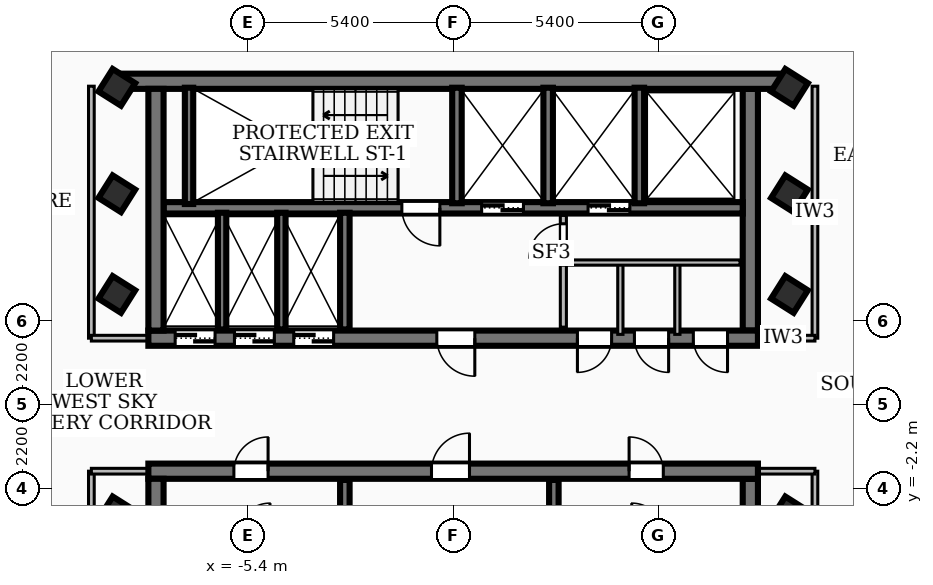
"""IFC4 building model, lengths in metres.
Left out: names, types, materials, properties, quantities, classifications, styles, units other than length and angle.
Written with IfcOpenShell. Run it as: python <this file> out.ifc"""

import sys

from ifc_helpers import new_model, si_unit, direction, frame, frame_2d, origin, origin_2d, place, context, subcontext, project, spatial, rectangle, extrude, element, fill, save


model = new_model("IFC4")
c1 = context("Model", 3, precision=1e-05, world=origin(), true_north=direction((0.0, 1.0)))
c2 = subcontext(c1, "Body", "Model", "MODEL_VIEW")
j1 = project(units=[si_unit("LENGTHUNIT", "METRE"), si_unit("PLANEANGLEUNIT", "RADIAN")], contexts=[c1])
p1 = place(None, origin())
s1 = spatial("IfcSite", under=j1, at=p1, CompositionType="ELEMENT")
p2 = place(p1, origin())
s2 = spatial("IfcBuilding", under=s1, at=p2, CompositionType="ELEMENT")
p3 = place(p2, frame((0.0, 0.0, 274.86)))
s3 = spatial("IfcBuildingStorey", under=s2, at=p3, CompositionType="ELEMENT", Elevation=274.86)
p4 = place(p3, frame((-8.78, 8.51, 0.0), z_axis=(0.0, 0.0, 1.0), x_axis=(1.0, 0.0, 0.0)))
e1 = element("IfcWall", 1, at=p4, inside=s3, PredefinedType="SHEAR", context=c2, shape_type="SweptSolid", body=[
    extrude(rectangle(XDim=17.56, YDim=0.4, at=frame_2d((8.78, 0.0))), origin(), (0.0, 0.0, 1.0), 3.16),
])
p5 = place(p3, frame((8.02, 1.75, 0.0), z_axis=(0.0, 0.0, 1.0), x_axis=(-1.0, 0.0, 0.0)))
e2 = element("IfcWall", 2, at=p5, inside=s3, PredefinedType="SHEAR", context=c2, shape_type="SweptSolid", body=[
    extrude(rectangle(XDim=16.04, YDim=0.4, at=frame_2d((8.02, 0.0))), origin(), (0.0, 0.0, 1.0), 3.16),
])
p6 = place(p5, frame((7.45, 0.0, 0.0)))
e3 = element("IfcOpeningElement", 3, at=p6, cuts=e2, PredefinedType="OPENING", context=c2, shape_type="SweptSolid", body=[
    extrude(rectangle(XDim=1.0, YDim=2.1, at=frame_2d((0.5, 1.05))), frame((0.0, 0.21, 0.0), z_axis=(0.0, -1.0, 0.0), x_axis=(1.0, 0.0, 0.0)), (0.0, 0.0, 1.0), 0.42),
])
p7 = place(p5, frame((14.285, 0.0, 0.0)))
e4 = element("IfcOpeningElement", 4, at=p7, cuts=e2, PredefinedType="OPENING", context=c2, shape_type="SweptSolid", body=[
    extrude(rectangle(XDim=1.05, YDim=2.15, at=frame_2d((0.525, 1.075))), frame((0.0, 0.21, 0.0), z_axis=(0.0, -1.0, 0.0), x_axis=(1.0, 0.0, 0.0)), (0.0, 0.0, 1.0), 0.42),
])
p8 = place(p5, frame((12.725, 0.0, 0.0)))
e5 = element("IfcOpeningElement", 5, at=p8, cuts=e2, PredefinedType="OPENING", context=c2, shape_type="SweptSolid", body=[
    extrude(rectangle(XDim=1.05, YDim=2.15, at=frame_2d((0.525, 1.075))), frame((0.0, 0.21, 0.0), z_axis=(0.0, -1.0, 0.0), x_axis=(1.0, 0.0, 0.0)), (0.0, 0.0, 1.0), 0.42),
])
p9 = place(p5, frame((11.165, 0.0, 0.0)))
e6 = element("IfcOpeningElement", 6, at=p9, cuts=e2, PredefinedType="OPENING", context=c2, shape_type="SweptSolid", body=[
    extrude(rectangle(XDim=1.05, YDim=2.15, at=frame_2d((0.525, 1.075))), frame((0.0, 0.21, 0.0), z_axis=(0.0, -1.0, 0.0), x_axis=(1.0, 0.0, 0.0)), (0.0, 0.0, 1.0), 0.42),
])
p10 = place(p5, frame((3.85, 0.0, 0.0)))
e7 = element("IfcOpeningElement", 7, at=p10, cuts=e2, PredefinedType="OPENING", context=c2, shape_type="SweptSolid", body=[
    extrude(rectangle(XDim=0.9, YDim=2.06, at=frame_2d((0.45, 1.03))), frame((0.0, 0.21, 0.0), z_axis=(0.0, -1.0, 0.0), x_axis=(1.0, 0.0, 0.0)), (0.0, 0.0, 1.0), 0.42),
])
p11 = place(p5, frame((2.35, 0.0, 0.0)))
e8 = element("IfcOpeningElement", 8, at=p11, cuts=e2, PredefinedType="OPENING", context=c2, shape_type="SweptSolid", body=[
    extrude(rectangle(XDim=0.9, YDim=2.06, at=frame_2d((0.45, 1.03))), frame((0.0, 0.21, 0.0), z_axis=(0.0, -1.0, 0.0), x_axis=(1.0, 0.0, 0.0)), (0.0, 0.0, 1.0), 0.42),
])
p12 = place(p5, frame((0.8, 0.0, 0.0)))
e9 = element("IfcOpeningElement", 9, at=p12, cuts=e2, PredefinedType="OPENING", context=c2, shape_type="SweptSolid", body=[
    extrude(rectangle(XDim=0.9, YDim=2.06, at=frame_2d((0.45, 1.03))), frame((0.0, 0.21, 0.0), z_axis=(0.0, -1.0, 0.0), x_axis=(1.0, 0.0, 0.0)), (0.0, 0.0, 1.0), 0.42),
])
for number, where, z_axis, x_axis in (
    (10, (-7.82, 1.95, 0.0), (0.0, 0.0, 1.0), (0.0, 1.0, 0.0)),
    (11, (7.82, 8.31, 0.0), (0.0, 0.0, 1.0), (0.0, -1.0, 0.0)),
):
    element("IfcWall", number, at=place(p3, frame(where, z_axis=z_axis, x_axis=x_axis)), inside=s3, PredefinedType="SHEAR", context=c2, shape_type="SweptSolid", body=[
        extrude(rectangle(XDim=6.36, YDim=0.4, at=frame_2d((3.18, 0.0))), origin(), (0.0, 0.0, 1.0), 3.16),
    ])
p13 = place(p3, frame((7.62, 5.18, 0.0), z_axis=(0.0, 0.0, 1.0), x_axis=(-1.0, 0.0, 0.0)))
e12 = element("IfcWall", 12, at=p13, inside=s3, PredefinedType="SOLIDWALL", context=c2, shape_type="SweptSolid", body=[
    extrude(rectangle(XDim=15.24, YDim=0.3, at=frame_2d((7.62, 0.0))), origin(), (0.0, 0.0, 1.0), 3.16),
])
p14 = place(p13, frame((5.77, 0.0, 0.0)))
e13 = element("IfcOpeningElement", 13, at=p14, cuts=e12, PredefinedType="OPENING", context=c2, shape_type="SweptSolid", body=[
    extrude(rectangle(XDim=1.1, YDim=2.15, at=frame_2d((0.55, 1.075))), frame((0.0, 0.16, 0.0), z_axis=(0.0, -1.0, 0.0), x_axis=(1.0, 0.0, 0.0)), (0.0, 0.0, 1.0), 0.32),
])
p15 = place(p13, frame((2.97, 0.0, 0.0)))
e14 = element("IfcOpeningElement", 14, at=p15, cuts=e12, PredefinedType="OPENING", context=c2, shape_type="SweptSolid", body=[
    extrude(rectangle(XDim=1.1, YDim=2.15, at=frame_2d((0.55, 1.075))), frame((0.0, 0.16, 0.0), z_axis=(0.0, -1.0, 0.0), x_axis=(1.0, 0.0, 0.0)), (0.0, 0.0, 1.0), 0.32),
])
p16 = place(p13, frame((7.97, 0.0, 0.0)))
e15 = element("IfcOpeningElement", 15, at=p16, cuts=e12, PredefinedType="OPENING", context=c2, shape_type="SweptSolid", body=[
    extrude(rectangle(XDim=1.0, YDim=2.1, at=frame_2d((0.5, 1.05))), frame((0.0, 0.16, 0.0), z_axis=(0.0, -1.0, 0.0), x_axis=(1.0, 0.0, 0.0)), (0.0, 0.0, 1.0), 0.32),
])
p17 = place(p3, frame((-8.02, -1.75, 0.0), z_axis=(0.0, 0.0, 1.0), x_axis=(1.0, 0.0, 0.0)))
e16 = element("IfcWall", 16, at=p17, inside=s3, PredefinedType="SHEAR", context=c2, shape_type="SweptSolid", body=[
    extrude(rectangle(XDim=16.04, YDim=0.4, at=frame_2d((8.02, 0.0))), origin(), (0.0, 0.0, 1.0), 3.16),
])
p18 = place(p17, frame((7.45, 0.0, 0.0)))
e17 = element("IfcOpeningElement", 17, at=p18, cuts=e16, PredefinedType="OPENING", context=c2, shape_type="SweptSolid", body=[
    extrude(rectangle(XDim=1.0, YDim=2.1, at=frame_2d((0.5, 1.05))), frame((0.0, 0.21, 0.0), z_axis=(0.0, -1.0, 0.0), x_axis=(1.0, 0.0, 0.0)), (0.0, 0.0, 1.0), 0.42),
])
p19 = place(p17, frame((12.65, 0.0, 0.0)))
e18 = element("IfcOpeningElement", 18, at=p19, cuts=e16, PredefinedType="OPENING", context=c2, shape_type="SweptSolid", body=[
    extrude(rectangle(XDim=0.9, YDim=2.06, at=frame_2d((0.45, 1.03))), frame((0.0, 0.21, 0.0), z_axis=(0.0, -1.0, 0.0), x_axis=(1.0, 0.0, 0.0)), (0.0, 0.0, 1.0), 0.42),
])
p20 = place(p17, frame((2.25, 0.0, 0.0)))
e19 = element("IfcOpeningElement", 19, at=p20, cuts=e16, PredefinedType="OPENING", context=c2, shape_type="SweptSolid", body=[
    extrude(rectangle(XDim=0.9, YDim=2.06, at=frame_2d((0.45, 1.03))), frame((0.0, 0.21, 0.0), z_axis=(0.0, -1.0, 0.0), x_axis=(1.0, 0.0, 0.0)), (0.0, 0.0, 1.0), 0.42),
])
for number, where, z_axis, x_axis in (
    (20, (-7.82, -8.31, 0.0), (0.0, 0.0, 1.0), (0.0, 1.0, 0.0)),
    (21, (7.82, -1.95, 0.0), (0.0, 0.0, 1.0), (0.0, -1.0, 0.0)),
):
    element("IfcWall", number, at=place(p3, frame(where, z_axis=z_axis, x_axis=x_axis)), inside=s3, PredefinedType="SHEAR", context=c2, shape_type="SweptSolid", body=[
        extrude(rectangle(XDim=6.36, YDim=0.4, at=frame_2d((3.18, 0.0))), origin(), (0.0, 0.0, 1.0), 3.16),
    ])
p21 = place(p3, frame((-6.95, 5.28, 0.0), z_axis=(0.0, 0.0, 1.0), x_axis=(0.0, 1.0, 0.0)))
e22 = element("IfcWall", 22, at=p21, inside=s3, PredefinedType="SOLIDWALL", context=c2, shape_type="SweptSolid", body=[
    extrude(rectangle(XDim=3.06, YDim=0.22, at=frame_2d((1.53, 0.0))), origin(), (0.0, 0.0, 1.0), 3.16),
])
for number, where, z_axis, x_axis in (
    (23, (0.1, 5.3, 0.0), (0.0, 0.0, 1.0), (0.0, 1.0, 0.0)),
    (24, (2.5, 5.3, 0.0), (0.0, 0.0, 1.0), (0.0, 1.0, 0.0)),
    (25, (4.9, 5.3, 0.0), (0.0, 0.0, 1.0), (0.0, 1.0, 0.0)),
):
    element("IfcWall", number, at=place(p3, frame(where, z_axis=z_axis, x_axis=x_axis)), inside=s3, PredefinedType="SOLIDWALL", context=c2, shape_type="SweptSolid", body=[
        extrude(rectangle(XDim=3.04, YDim=0.25, at=frame_2d((1.52, 0.0))), origin(), (0.0, 0.0, 1.0), 3.16),
    ])
for number, where, z_axis, x_axis in (
    (26, (-2.85, 1.98, 0.0), (0.0, 0.0, 1.0), (0.0, 1.0, 0.0)),
    (27, (-2.85, -5.05, 0.0), (0.0, 0.0, 1.0), (0.0, 1.0, 0.0)),
    (28, (2.65, -5.05, 0.0), (0.0, 0.0, 1.0), (0.0, 1.0, 0.0)),
):
    element("IfcWall", number, at=place(p3, frame(where, z_axis=z_axis, x_axis=x_axis)), inside=s3, PredefinedType="SOLIDWALL", context=c2, shape_type="SweptSolid", body=[
        extrude(rectangle(XDim=3.07, YDim=0.25, at=frame_2d((1.535, 0.0))), origin(), (0.0, 0.0, 1.0), 3.16),
    ])
for number, where, z_axis, x_axis in (
    (29, (-6.08, 1.98, 0.0), (0.0, 0.0, 1.0), (0.0, 1.0, 0.0)),
    (30, (-4.52, 1.98, 0.0), (0.0, 0.0, 1.0), (0.0, 1.0, 0.0)),
):
    element("IfcWall", number, at=place(p3, frame(where, z_axis=z_axis, x_axis=x_axis)), inside=s3, PredefinedType="SOLIDWALL", context=c2, shape_type="SweptSolid", body=[
        extrude(rectangle(XDim=3.07, YDim=0.22, at=frame_2d((1.535, 0.0))), origin(), (0.0, 0.0, 1.0), 3.16),
    ])
for number, where, z_axis, x_axis in (
    (31, (-8.85, -2.9, 0.0), (0.0, 0.0, 1.0), (0.534, 0.845, 0.0)),
    (32, (-8.85, 2.9, 0.0), (0.0, 0.0, 1.0), (0.534, 0.845, 0.0)),
    (33, (-8.85, 5.55, 0.0), (0.0, 0.0, 1.0), (0.534, 0.845, 0.0)),
    (34, (8.85, -2.9, 0.0), (0.0, 0.0, 1.0), (0.534, 0.845, 0.0)),
    (35, (8.85, 2.9, 0.0), (0.0, 0.0, 1.0), (0.534, 0.845, 0.0)),
    (36, (8.85, 5.55, 0.0), (0.0, 0.0, 1.0), (0.534, 0.845, 0.0)),
    (37, (-8.85, 8.35, 0.0), (0.0, 0.0, 1.0), (0.534, 0.845, 0.0)),
    (38, (8.85, 8.35, 0.0), (0.0, 0.0, 1.0), (0.534, 0.845, 0.0)),
):
    element("IfcColumn", number, at=place(p3, frame(where, z_axis=z_axis, x_axis=x_axis)), inside=s3, PredefinedType="COLUMN", context=c2, shape_type="SweptSolid", body=[
        extrude(rectangle(XDim=0.7, YDim=0.7, at=origin_2d()), origin(), (0.0, 0.0, 1.0), 3.42),
    ])
p22 = place(p3, frame((2.9, 2.04, 0.0), z_axis=(0.0, 0.0, 1.0), x_axis=(0.0, 1.0, 0.0)))
e39 = element("IfcWall", 39, at=p22, inside=s3, PredefinedType="PARTITIONING", context=c2, shape_type="SweptSolid", body=[
    extrude(rectangle(XDim=2.94, YDim=0.16, at=frame_2d((1.47, 0.0))), origin(), (0.0, 0.0, 1.0), 2.39),
])
p23 = place(p22, frame((1.82, 0.0, 0.0)))
e40 = element("IfcOpeningElement", 40, at=p23, cuts=e39, PredefinedType="OPENING", context=c2, shape_type="SweptSolid", body=[
    extrude(rectangle(XDim=0.9, YDim=2.06, at=frame_2d((0.45, 1.03))), frame((0.0, 0.09, 0.0), z_axis=(0.0, -1.0, 0.0), x_axis=(1.0, 0.0, 0.0)), (0.0, 0.0, 1.0), 0.18),
])
p24 = place(p3, frame((2.9, 3.74, 0.0), z_axis=(0.0, 0.0, 1.0), x_axis=(1.0, 0.0, 0.0)))
e41 = element("IfcWall", 41, at=p24, inside=s3, PredefinedType="PARTITIONING", context=c2, shape_type="SweptSolid", body=[
    extrude(rectangle(XDim=4.65, YDim=0.138, at=frame_2d((2.325, 0.0))), origin(), (0.0, 0.0, 1.0), 3.16),
])
for number, where, z_axis, x_axis in (
    (42, (4.4, 1.85, 0.0), (0.0, 0.0, 1.0), (0.0, 1.0, 0.0)),
    (43, (5.9, 1.85, 0.0), (0.0, 0.0, 1.0), (0.0, 1.0, 0.0)),
):
    element("IfcWall", number, at=place(p3, frame(where, z_axis=z_axis, x_axis=x_axis)), inside=s3, PredefinedType="PARTITIONING", context=c2, shape_type="SweptSolid", body=[
        extrude(rectangle(XDim=1.89, YDim=0.138, at=frame_2d((0.945, 0.0))), origin(), (0.0, 0.0, 1.0), 2.39),
    ])
p25 = place(p3, frame((-9.52, 1.75, 0.0), z_axis=(0.0, 0.0, 1.0), x_axis=(0.0, 1.0, 0.0)))
e44 = element("IfcWall", 44, at=p25, inside=s3, PredefinedType="PARTITIONING", context=c2, shape_type="SweptSolid", body=[
    extrude(rectangle(XDim=6.63, YDim=0.15, at=frame_2d((3.315, 0.0))), origin(), (0.0, 0.0, 1.0), 2.53),
])
p26 = place(p3, frame((-7.85, 1.75, 0.0), z_axis=(0.0, 0.0, 1.0), x_axis=(-1.0, 0.0, 0.0)))
e45 = element("IfcWall", 45, at=p26, inside=s3, PredefinedType="PARTITIONING", context=c2, shape_type="SweptSolid", body=[
    extrude(rectangle(XDim=1.67, YDim=0.15, at=frame_2d((0.835, 0.0))), origin(), (0.0, 0.0, 1.0), 2.39),
])
p27 = place(p3, frame((-9.52, -8.38, 0.0), z_axis=(0.0, 0.0, 1.0), x_axis=(0.0, 1.0, 0.0)))
e46 = element("IfcWall", 46, at=p27, inside=s3, PredefinedType="PARTITIONING", context=c2, shape_type="SweptSolid", body=[
    extrude(rectangle(XDim=6.63, YDim=0.15, at=frame_2d((3.315, 0.0))), origin(), (0.0, 0.0, 1.0), 3.16),
])
p28 = place(p3, frame((-7.85, -1.75, 0.0), z_axis=(0.0, 0.0, 1.0), x_axis=(-1.0, 0.0, 0.0)))
e47 = element("IfcWall", 47, at=p28, inside=s3, PredefinedType="PARTITIONING", context=c2, shape_type="SweptSolid", body=[
    extrude(rectangle(XDim=1.67, YDim=0.15, at=frame_2d((0.835, 0.0))), origin(), (0.0, 0.0, 1.0), 2.39),
])
p29 = place(p3, frame((9.52, 1.75, 0.0), z_axis=(0.0, 0.0, 1.0), x_axis=(0.0, 1.0, 0.0)))
e48 = element("IfcWall", 48, at=p29, inside=s3, PredefinedType="PARTITIONING", context=c2, shape_type="SweptSolid", body=[
    extrude(rectangle(XDim=6.63, YDim=0.15, at=frame_2d((3.315, 0.0))), origin(), (0.0, 0.0, 1.0), 3.16),
])
p30 = place(p3, frame((7.85, 1.75, 0.0), z_axis=(0.0, 0.0, 1.0), x_axis=(1.0, 0.0, 0.0)))
e49 = element("IfcWall", 49, at=p30, inside=s3, PredefinedType="PARTITIONING", context=c2, shape_type="SweptSolid", body=[
    extrude(rectangle(XDim=1.67, YDim=0.15, at=frame_2d((0.835, 0.0))), origin(), (0.0, 0.0, 1.0), 2.39),
])
p31 = place(p3, frame((9.52, -8.38, 0.0), z_axis=(0.0, 0.0, 1.0), x_axis=(0.0, 1.0, 0.0)))
e50 = element("IfcWall", 50, at=p31, inside=s3, PredefinedType="PARTITIONING", context=c2, shape_type="SweptSolid", body=[
    extrude(rectangle(XDim=6.63, YDim=0.15, at=frame_2d((3.315, 0.0))), origin(), (0.0, 0.0, 1.0), 2.53),
])
p32 = place(p3, frame((7.85, -1.75, 0.0), z_axis=(0.0, 0.0, 1.0), x_axis=(1.0, 0.0, 0.0)))
e51 = element("IfcWall", 51, at=p32, inside=s3, PredefinedType="PARTITIONING", context=c2, shape_type="SweptSolid", body=[
    extrude(rectangle(XDim=1.67, YDim=0.15, at=frame_2d((0.835, 0.0))), origin(), (0.0, 0.0, 1.0), 2.39),
])
p33 = place(p3, frame((15.512, 7.104, 0.0), z_axis=(0.0, 0.0, 1.0), x_axis=(-0.845450958208, 0.534053065963, 0.0)))
e52 = element("IfcWall", 52, at=p33, inside=s3, PredefinedType="PARTITIONING", context=c2, shape_type="SweptSolid", body=[
    extrude(rectangle(XDim=7.951, YDim=0.1, at=frame_2d((3.975, 0.0))), origin(), (0.0, 0.0, 1.0), 2.53),
])
p34 = place(p3, frame((-17.646, -1.178, 0.0), z_axis=(0.0, 0.0, 1.0), x_axis=(0.534052309352, 0.845451436143, 0.0)))
e53 = element("IfcWall", 53, at=p34, inside=s3, PredefinedType="PARTITIONING", context=c2, shape_type="SweptSolid", body=[
    extrude(rectangle(XDim=20.44, YDim=0.1, at=frame_2d((10.22, 0.0))), origin(), (0.0, 0.0, 1.0), 2.53),
])
p35 = place(p34, frame((11.259, 0.0, 0.0)))
e54 = element("IfcOpeningElement", 54, at=p35, cuts=e53, PredefinedType="OPENING", context=c2, shape_type="SweptSolid", body=[
    extrude(rectangle(XDim=0.86, YDim=2.04, at=frame_2d((0.43, 1.02))), frame((0.0, 0.06, 0.0), z_axis=(0.0, -1.0, 0.0), x_axis=(1.0, 0.0, 0.0)), (0.0, 0.0, 1.0), 0.12),
])
p36 = place(p34, frame((9.819, 0.0, 0.0)))
e55 = element("IfcOpeningElement", 55, at=p36, cuts=e53, PredefinedType="OPENING", context=c2, shape_type="SweptSolid", body=[
    extrude(rectangle(XDim=0.86, YDim=2.04, at=frame_2d((0.43, 1.02))), frame((0.0, 0.06, 0.0), z_axis=(0.0, -1.0, 0.0), x_axis=(1.0, 0.0, 0.0)), (0.0, 0.0, 1.0), 0.12),
])
p37 = place(p3, frame((17.646, 1.178, 0.0), z_axis=(0.0, 0.0, 1.0), x_axis=(-0.534052309352, -0.845451436143, 0.0)))
e56 = element("IfcWall", 56, at=p37, inside=s3, PredefinedType="PARTITIONING", context=c2, shape_type="SweptSolid", body=[
    extrude(rectangle(XDim=20.44, YDim=0.1, at=frame_2d((10.22, 0.0))), origin(), (0.0, 0.0, 1.0), 2.53),
])
p38 = place(p37, frame((10.159, 0.0, 0.0)))
e57 = element("IfcOpeningElement", 57, at=p38, cuts=e56, PredefinedType="OPENING", context=c2, shape_type="SweptSolid", body=[
    extrude(rectangle(XDim=0.86, YDim=2.04, at=frame_2d((0.43, 1.02))), frame((0.0, 0.06, 0.0), z_axis=(0.0, -1.0, 0.0), x_axis=(1.0, 0.0, 0.0)), (0.0, 0.0, 1.0), 0.12),
])
p39 = place(p37, frame((8.719, 0.0, 0.0)))
e58 = element("IfcOpeningElement", 58, at=p39, cuts=e56, PredefinedType="OPENING", context=c2, shape_type="SweptSolid", body=[
    extrude(rectangle(XDim=0.86, YDim=2.04, at=frame_2d((0.43, 1.02))), frame((0.0, 0.06, 0.0), z_axis=(0.0, -1.0, 0.0), x_axis=(1.0, 0.0, 0.0)), (0.0, 0.0, 1.0), 0.12),
])
p40 = place(p6, origin())
e59 = element("IfcDoor", 59, at=p40, inside=s3, OperationType="SINGLE_SWING_LEFT", PredefinedType="DOOR", context=c2, shape_type="SweptSolid", body=[
    extrude(rectangle(XDim=1.0, YDim=2.1, at=frame_2d((0.5, 1.05))), frame((0.0, 0.025, 0.0), z_axis=(0.0, -1.0, 0.0), x_axis=(1.0, 0.0, 0.0)), (0.0, 0.0, 1.0), 0.05),
])
fill(e3, e59)
p41 = place(p18, origin())
e60 = element("IfcDoor", 60, at=p41, inside=s3, OperationType="SINGLE_SWING_RIGHT", PredefinedType="DOOR", context=c2, shape_type="SweptSolid", body=[
    extrude(rectangle(XDim=1.0, YDim=2.1, at=frame_2d((0.5, 1.05))), frame((0.0, 0.025, 0.0), z_axis=(0.0, -1.0, 0.0), x_axis=(1.0, 0.0, 0.0)), (0.0, 0.0, 1.0), 0.05),
])
fill(e17, e60)
p42 = place(p14, origin())
e61 = element("IfcDoor", 61, at=p42, inside=s3, OperationType="DOUBLE_DOOR_SLIDING", PredefinedType="DOOR", context=c2, shape_type="SweptSolid", body=[
    extrude(rectangle(XDim=1.1, YDim=2.15, at=frame_2d((0.55, 1.075))), frame((0.0, 0.025, 0.0), z_axis=(0.0, -1.0, 0.0), x_axis=(1.0, 0.0, 0.0)), (0.0, 0.0, 1.0), 0.05),
])
fill(e13, e61)
p43 = place(p15, origin())
e62 = element("IfcDoor", 62, at=p43, inside=s3, OperationType="DOUBLE_DOOR_SLIDING", PredefinedType="DOOR", context=c2, shape_type="SweptSolid", body=[
    extrude(rectangle(XDim=1.1, YDim=2.15, at=frame_2d((0.55, 1.075))), frame((0.0, 0.025, 0.0), z_axis=(0.0, -1.0, 0.0), x_axis=(1.0, 0.0, 0.0)), (0.0, 0.0, 1.0), 0.05),
])
fill(e14, e62)
p44 = place(p16, origin())
e63 = element("IfcDoor", 63, at=p44, inside=s3, OperationType="SINGLE_SWING_LEFT", PredefinedType="DOOR", context=c2, shape_type="SweptSolid", body=[
    extrude(rectangle(XDim=1.0, YDim=2.1, at=frame_2d((0.5, 1.05))), frame((0.0, 0.025, 0.0), z_axis=(0.0, -1.0, 0.0), x_axis=(1.0, 0.0, 0.0)), (0.0, 0.0, 1.0), 0.05),
])
fill(e15, e63)
p45 = place(p7, origin())
e64 = element("IfcDoor", 64, at=p45, inside=s3, OperationType="DOUBLE_DOOR_SLIDING", PredefinedType="DOOR", context=c2, shape_type="SweptSolid", body=[
    extrude(rectangle(XDim=1.05, YDim=2.15, at=frame_2d((0.525, 1.075))), frame((0.0, 0.025, 0.0), z_axis=(0.0, -1.0, 0.0), x_axis=(1.0, 0.0, 0.0)), (0.0, 0.0, 1.0), 0.05),
])
fill(e4, e64)
p46 = place(p8, origin())
e65 = element("IfcDoor", 65, at=p46, inside=s3, OperationType="DOUBLE_DOOR_SLIDING", PredefinedType="DOOR", context=c2, shape_type="SweptSolid", body=[
    extrude(rectangle(XDim=1.05, YDim=2.15, at=frame_2d((0.525, 1.075))), frame((0.0, 0.025, 0.0), z_axis=(0.0, -1.0, 0.0), x_axis=(1.0, 0.0, 0.0)), (0.0, 0.0, 1.0), 0.05),
])
fill(e5, e65)
p47 = place(p9, origin())
e66 = element("IfcDoor", 66, at=p47, inside=s3, OperationType="DOUBLE_DOOR_SLIDING", PredefinedType="DOOR", context=c2, shape_type="SweptSolid", body=[
    extrude(rectangle(XDim=1.05, YDim=2.15, at=frame_2d((0.525, 1.075))), frame((0.0, 0.025, 0.0), z_axis=(0.0, -1.0, 0.0), x_axis=(1.0, 0.0, 0.0)), (0.0, 0.0, 1.0), 0.05),
])
fill(e6, e66)
p48 = place(p19, origin())
e67 = element("IfcDoor", 67, at=p48, inside=s3, OperationType="SINGLE_SWING_LEFT", PredefinedType="DOOR", context=c2, shape_type="SweptSolid", body=[
    extrude(rectangle(XDim=0.9, YDim=2.06, at=frame_2d((0.45, 1.03))), frame((0.0, 0.025, 0.0), z_axis=(0.0, -1.0, 0.0), x_axis=(1.0, 0.0, 0.0)), (0.0, 0.0, 1.0), 0.05),
])
fill(e18, e67)
p49 = place(p20, origin())
e68 = element("IfcDoor", 68, at=p49, inside=s3, OperationType="SINGLE_SWING_RIGHT", PredefinedType="DOOR", context=c2, shape_type="SweptSolid", body=[
    extrude(rectangle(XDim=0.9, YDim=2.06, at=frame_2d((0.45, 1.03))), frame((0.0, 0.025, 0.0), z_axis=(0.0, -1.0, 0.0), x_axis=(1.0, 0.0, 0.0)), (0.0, 0.0, 1.0), 0.05),
])
fill(e19, e68)
p50 = place(p10, origin())
e69 = element("IfcDoor", 69, at=p50, inside=s3, OperationType="SINGLE_SWING_RIGHT", PredefinedType="DOOR", context=c2, shape_type="SweptSolid", body=[
    extrude(rectangle(XDim=0.9, YDim=2.06, at=frame_2d((0.45, 1.03))), frame((0.0, 0.025, 0.0), z_axis=(0.0, -1.0, 0.0), x_axis=(1.0, 0.0, 0.0)), (0.0, 0.0, 1.0), 0.05),
])
fill(e7, e69)
p51 = place(p11, origin())
e70 = element("IfcDoor", 70, at=p51, inside=s3, OperationType="SINGLE_SWING_LEFT", PredefinedType="DOOR", context=c2, shape_type="SweptSolid", body=[
    extrude(rectangle(XDim=0.9, YDim=2.06, at=frame_2d((0.45, 1.03))), frame((0.0, 0.025, 0.0), z_axis=(0.0, -1.0, 0.0), x_axis=(1.0, 0.0, 0.0)), (0.0, 0.0, 1.0), 0.05),
])
fill(e8, e70)
p52 = place(p12, origin())
e71 = element("IfcDoor", 71, at=p52, inside=s3, OperationType="SINGLE_SWING_LEFT", PredefinedType="DOOR", context=c2, shape_type="SweptSolid", body=[
    extrude(rectangle(XDim=0.9, YDim=2.06, at=frame_2d((0.45, 1.03))), frame((0.0, 0.025, 0.0), z_axis=(0.0, -1.0, 0.0), x_axis=(1.0, 0.0, 0.0)), (0.0, 0.0, 1.0), 0.05),
])
fill(e9, e71)
p53 = place(p23, origin())
e72 = element("IfcDoor", 72, at=p53, inside=s3, OperationType="SINGLE_SWING_LEFT", PredefinedType="DOOR", context=c2, shape_type="SweptSolid", body=[
    extrude(rectangle(XDim=0.9, YDim=2.06, at=frame_2d((0.45, 1.03))), frame((0.0, 0.025, 0.0), z_axis=(0.0, -1.0, 0.0), x_axis=(1.0, 0.0, 0.0)), (0.0, 0.0, 1.0), 0.05),
])
fill(e40, e72)
save(model, sys.argv[1])
